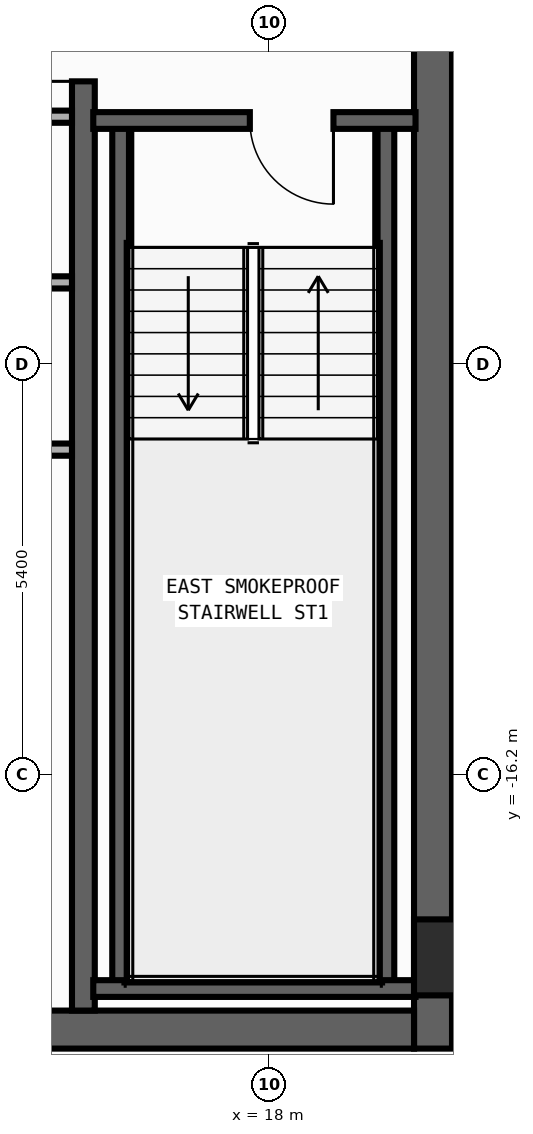
"""IFC4 building model, lengths in metres.
Left out: names, types, materials, properties, quantities, classifications, styles, units other than length and angle.
Written with IfcOpenShell. Run it as: python <this file> out.ifc"""

import sys

from ifc_helpers import new_model, si_unit, direction, frame, frame_2d, origin, origin_2d, place, context, subcontext, project, spatial, rectangle, circle, extrude, element, fill, save


model = new_model("IFC4")
c1 = context("Model", 3, precision=1e-05, world=origin(), true_north=direction((0.0, 1.0)))
c2 = subcontext(c1, "Body", "Model", "MODEL_VIEW")
j1 = project(units=[si_unit("LENGTHUNIT", "METRE"), si_unit("PLANEANGLEUNIT", "RADIAN")], contexts=[c1])
p1 = place(None, origin())
s1 = spatial("IfcSite", under=j1, at=p1, CompositionType="ELEMENT")
p2 = place(p1, origin())
s2 = spatial("IfcBuilding", under=s1, at=p2, CompositionType="ELEMENT")
p3 = place(p2, frame((0.0, 0.0, 292.8)))
s3 = spatial("IfcBuildingStorey", under=s2, at=p3, CompositionType="ELEMENT", Elevation=292.8)
p4 = place(p3, frame((20.15, -19.8, 0.0), z_axis=(0.0, 0.0, 1.0), x_axis=(0.0, 1.0, 0.0)))
e1 = element("IfcWall", 1, at=p4, inside=s3, PredefinedType="SHEAR", context=c2, shape_type="SweptSolid", body=[
    extrude(rectangle(XDim=27.0, YDim=0.5, at=frame_2d((13.5, 0.0))), origin(), (0.0, 0.0, 1.0), 3.54),
])
p5 = place(p3, frame((12.5, -19.55, 0.0), z_axis=(0.0, 0.0, 1.0), x_axis=(1.0, 0.0, 0.0)))
e2 = element("IfcWall", 2, at=p5, inside=s3, PredefinedType="SHEAR", context=c2, shape_type="SweptSolid", body=[
    extrude(rectangle(XDim=7.4, YDim=0.5, at=frame_2d((3.7, 0.0))), origin(), (0.0, 0.0, 1.0), 3.54),
])
p6 = place(p3, frame((15.55, -19.3, 0.0), z_axis=(0.0, 0.0, 1.0), x_axis=(0.0, 1.0, 0.0)))
e3 = element("IfcWall", 3, at=p6, inside=s3, PredefinedType="SHEAR", context=c2, shape_type="SweptSolid", body=[
    extrude(rectangle(XDim=26.0, YDim=0.3, at=frame_2d((13.0, 0.0))), origin(), (0.0, 0.0, 1.0), 3.54),
])
p7 = place(p6, frame((12.225, 0.0, 0.0)))
e4 = element("IfcOpeningElement", 4, at=p7, cuts=e3, PredefinedType="OPENING", context=c2, shape_type="SweptSolid", body=[
    extrude(rectangle(XDim=1.15, YDim=2.2, at=frame_2d((0.575, 1.1))), frame((0.0, 0.16, 0.0), z_axis=(0.0, -1.0, 0.0), x_axis=(1.0, 0.0, 0.0)), (0.0, 0.0, 1.0), 0.32),
])
p8 = place(p6, frame((24.625, 0.0, 0.0)))
e5 = element("IfcOpeningElement", 5, at=p8, cuts=e3, PredefinedType="OPENING", context=c2, shape_type="SweptSolid", body=[
    extrude(rectangle(XDim=0.85, YDim=2.1, at=frame_2d((0.425, 1.05))), frame((0.0, 0.16, 0.0), z_axis=(0.0, -1.0, 0.0), x_axis=(1.0, 0.0, 0.0)), (0.0, 0.0, 1.0), 0.32),
])
for number, where, z_axis, x_axis in (
    (6, (16.04, -19.01, 0.0), (0.0, 0.0, 1.0), (0.0, 1.0, 0.0)),
    (7, (19.53, -19.01, 0.0), (0.0, 0.0, 1.0), (0.0, 1.0, 0.0)),
):
    element("IfcWall", number, at=place(p3, frame(where, z_axis=z_axis, x_axis=x_axis)), inside=s3, PredefinedType="SHEAR", context=c2, shape_type="SweptSolid", body=[
        extrude(rectangle(XDim=11.42, YDim=0.22, at=frame_2d((5.71, 0.0))), origin(), (0.0, 0.0, 1.0), 3.54),
    ])
p9 = place(p3, frame((15.68, -19.01, 0.0), z_axis=(0.0, 0.0, 1.0), x_axis=(1.0, 0.0, 0.0)))
e8 = element("IfcWall", 8, at=p9, inside=s3, PredefinedType="SHEAR", context=c2, shape_type="SweptSolid", body=[
    extrude(rectangle(XDim=4.24, YDim=0.22, at=frame_2d((2.12, 0.0))), origin(), (0.0, 0.0, 1.0), 3.54),
])
p10 = place(p3, frame((19.92, -7.59, 0.0), z_axis=(0.0, 0.0, 1.0), x_axis=(-1.0, 0.0, 0.0)))
e9 = element("IfcWall", 9, at=p10, inside=s3, PredefinedType="SHEAR", context=c2, shape_type="SweptSolid", body=[
    extrude(rectangle(XDim=4.24, YDim=0.22, at=frame_2d((2.12, 0.0))), origin(), (0.0, 0.0, 1.0), 3.54),
])
p11 = place(p10, frame((1.08, 0.0, 0.0)))
e10 = element("IfcOpeningElement", 10, at=p11, cuts=e9, PredefinedType="OPENING", context=c2, shape_type="SweptSolid", body=[
    extrude(rectangle(XDim=1.1, YDim=2.2, at=frame_2d((0.55, 1.1))), frame((0.0, 0.12, 0.0), z_axis=(0.0, -1.0, 0.0), x_axis=(1.0, 0.0, 0.0)), (0.0, 0.0, 1.0), 0.24),
])
p12 = place(p3, frame((20.4, -18.6, 0.0), z_axis=(0.0, 0.0, 1.0), x_axis=(1.0, 0.0, 0.0)))
e11 = element("IfcColumn", 11, at=p12, inside=s3, PredefinedType="COLUMN", context=c2, shape_type="SweptSolid", body=[
    extrude(circle(Radius=0.5, at=origin_2d()), origin(), (0.0, 0.0, 1.0), 3.8),
])
p13 = place(p3, frame((12.8, -7.54, 0.0), z_axis=(0.0, 0.0, 1.0), x_axis=(1.0, 0.0, 0.0)))
e12 = element("IfcWall", 12, at=p13, inside=s3, PredefinedType="STANDARD", context=c2, shape_type="SweptSolid", body=[
    extrude(rectangle(XDim=2.6, YDim=0.16, at=frame_2d((1.3, 0.0))), origin(), (0.0, 0.0, 1.0), 3.54),
])
for number, where, z_axis, x_axis in (
    (13, (12.5, -11.92, 0.0), (0.0, 0.0, 1.0), (1.0, 0.0, 0.0)),
    (14, (12.5, -9.72, 0.0), (0.0, 0.0, 1.0), (1.0, 0.0, 0.0)),
):
    element("IfcWall", number, at=place(p3, frame(where, z_axis=z_axis, x_axis=x_axis)), inside=s3, PredefinedType="PARTITIONING", context=c2, shape_type="SweptSolid", body=[
        extrude(rectangle(XDim=2.9, YDim=0.16, at=frame_2d((1.45, 0.0))), origin(), (0.0, 0.0, 1.0), 3.54),
    ])
p14 = place(p11, origin())
e15 = element("IfcDoor", 15, at=p14, inside=s3, OperationType="SINGLE_SWING_LEFT", PredefinedType="DOOR", context=c2, shape_type="SweptSolid", body=[
    extrude(rectangle(XDim=1.1, YDim=2.2, at=frame_2d((0.55, 1.1))), frame((0.0, 0.025, 0.0), z_axis=(0.0, -1.0, 0.0), x_axis=(1.0, 0.0, 0.0)), (0.0, 0.0, 1.0), 0.05),
])
fill(e10, e15)
p15 = place(p7, origin())
e16 = element("IfcDoor", 16, at=p15, inside=s3, OperationType="SINGLE_SWING_LEFT", PredefinedType="DOOR", context=c2, shape_type="SweptSolid", body=[
    extrude(rectangle(XDim=1.15, YDim=2.2, at=frame_2d((0.575, 1.1))), frame((0.0, 0.025, 0.0), z_axis=(0.0, -1.0, 0.0), x_axis=(1.0, 0.0, 0.0)), (0.0, 0.0, 1.0), 0.05),
])
fill(e4, e16)
save(model, sys.argv[1])
